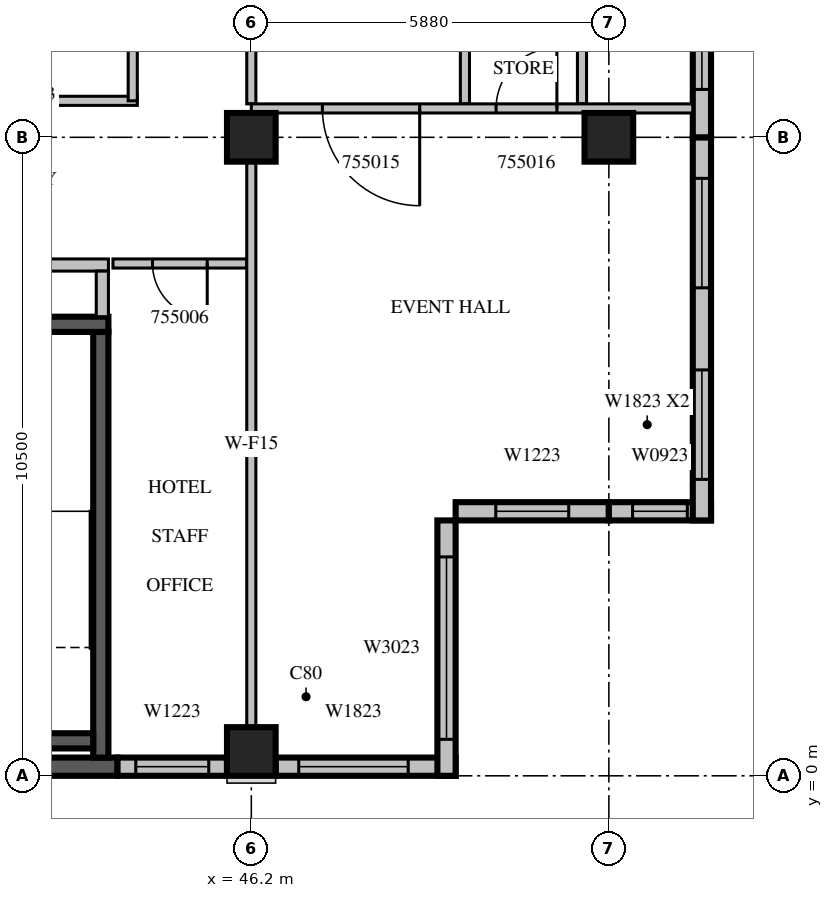
"""IFC4 building model, lengths in metres.
Left out: names, types, materials, properties, quantities, classifications, styles, units other than length and angle.
Written with IfcOpenShell. Run it as: python <this file> out.ifc"""

import sys

from ifc_helpers import new_model, si_unit, direction, frame, frame_2d, origin, origin_2d, place, context, subcontext, project, spatial, rectangle, extrude, source, transform, mapped, element, fill, save


model = new_model("IFC4")
c1 = context("Model", 3, precision=1e-05, world=origin(), true_north=direction((0.0, 1.0)))
c2 = subcontext(c1, "Body", "Model", "MODEL_VIEW")
j1 = project(units=[si_unit("LENGTHUNIT", "METRE"), si_unit("PLANEANGLEUNIT", "RADIAN")], contexts=[c1])
p1 = place(None, origin())
s1 = spatial("IfcSite", under=j1, at=p1, CompositionType="ELEMENT")
p2 = place(p1, origin())
s2 = spatial("IfcBuilding", under=s1, at=p2, CompositionType="ELEMENT")
p3 = place(p2, frame((0.0, 0.0, 242.4)))
s3 = spatial("IfcBuildingStorey", under=s2, at=p3, CompositionType="ELEMENT", Elevation=242.4)
m1 = source(origin(), c2, "Body", "SweptSolid", [
    extrude(rectangle(XDim=0.8, YDim=0.8, at=origin_2d()), origin(), (0.0, 0.0, 1.0), 3.8),
])
for number, where, z_axis, x_axis in (
    (1, (46.2, 0.4, 0.0), (0.0, 0.0, 1.0), (1.0, 0.0, 0.0)),
    (2, (46.2, 10.5, 0.0), (0.0, 0.0, 1.0), (1.0, 0.0, 0.0)),
    (3, (52.08, 10.5, 0.0), (0.0, 0.0, 1.0), (1.0, 0.0, 0.0)),
):
    element("IfcColumn", number, at=place(p3, frame(where, z_axis=z_axis, x_axis=x_axis)), inside=s3, PredefinedType="COLUMN", context=c2, shape_type="MappedRepresentation", body=[
        mapped(m1, transform((0.0, 0.0, 0.0), scale=1.0)),
    ])
m2 = source(origin(), c2, "Body", "SweptSolid", [
    extrude(rectangle(XDim=3.8, YDim=0.3, at=frame_2d((1.9, 0.0))), origin(), (0.0, 0.0, 1.0), 3.4),
])
p4 = place(p3, frame((40.2, 0.15, 0.0), z_axis=(0.0, 0.0, 1.0), x_axis=(1.0, 0.0, 0.0)))
e4 = element("IfcWall", 4, at=p4, inside=s3, PredefinedType="SOLIDWALL", context=c2, shape_type="MappedRepresentation", body=[
    mapped(m2, transform((0.0, 0.0, 0.0), scale=1.0)),
])
m3 = source(origin(), c2, "Body", "SweptSolid", [
    extrude(rectangle(XDim=1.8, YDim=0.3, at=frame_2d((0.9, 0.0))), origin(), (0.0, 0.0, 1.0), 3.4),
])
p5 = place(p3, frame((44.0, 0.15, 0.0), z_axis=(0.0, 0.0, 1.0), x_axis=(1.0, 0.0, 0.0)))
e5 = element("IfcWall", 5, at=p5, inside=s3, PredefinedType="STANDARD", context=c2, shape_type="MappedRepresentation", body=[
    mapped(m3, transform((0.0, 0.0, 0.0), scale=1.0)),
])
m4 = source(origin(), c2, "Body", "SweptSolid", [
    extrude(rectangle(XDim=1.2, YDim=2.3, at=frame_2d((0.6, 1.15))), frame((0.0, 0.16, 0.0), z_axis=(0.0, -1.0, 0.0), x_axis=(1.0, 0.0, 0.0)), (0.0, 0.0, 1.0), 0.32),
])
p6 = place(p5, frame((0.3, 0.0, 0.6)))
e6 = element("IfcOpeningElement", 6, at=p6, cuts=e5, PredefinedType="OPENING", context=c2, shape_type="MappedRepresentation", body=[
    mapped(m4, transform((0.0, 0.0, 0.0), scale=1.0)),
])
m5 = source(origin(), c2, "Body", "SweptSolid", [
    extrude(rectangle(XDim=2.96, YDim=0.3, at=frame_2d((1.48, 0.0))), origin(), (0.0, 0.0, 1.0), 3.4),
])
p7 = place(p3, frame((46.6, 0.15, 0.0), z_axis=(0.0, 0.0, 1.0), x_axis=(1.0, 0.0, 0.0)))
e7 = element("IfcWall", 7, at=p7, inside=s3, PredefinedType="STANDARD", context=c2, shape_type="MappedRepresentation", body=[
    mapped(m5, transform((0.0, 0.0, 0.0), scale=1.0)),
])
m6 = source(origin(), c2, "Body", "SweptSolid", [
    extrude(rectangle(XDim=1.8, YDim=2.3, at=frame_2d((0.9, 1.15))), frame((0.0, 0.16, 0.0), z_axis=(0.0, -1.0, 0.0), x_axis=(1.0, 0.0, 0.0)), (0.0, 0.0, 1.0), 0.32),
])
p8 = place(p7, frame((0.38, 0.0, 0.6)))
e8 = element("IfcOpeningElement", 8, at=p8, cuts=e7, PredefinedType="OPENING", context=c2, shape_type="MappedRepresentation", body=[
    mapped(m6, transform((0.0, 0.0, 0.0), scale=1.0)),
])
m7 = source(origin(), c2, "Body", "SweptSolid", [
    extrude(rectangle(XDim=4.2, YDim=0.3, at=frame_2d((2.1, 0.0))), origin(), (0.0, 0.0, 1.0), 3.4),
])
p9 = place(p3, frame((49.41, 0.0, 0.0), z_axis=(0.0, 0.0, 1.0), x_axis=(0.0, 1.0, 0.0)))
e9 = element("IfcWall", 9, at=p9, inside=s3, PredefinedType="STANDARD", context=c2, shape_type="MappedRepresentation", body=[
    mapped(m7, transform((0.0, 0.0, 0.0), scale=1.0)),
])
m8 = source(origin(), c2, "Body", "SweptSolid", [
    extrude(rectangle(XDim=3.0, YDim=2.3, at=frame_2d((1.5, 1.15))), frame((0.0, 0.16, 0.0), z_axis=(0.0, -1.0, 0.0), x_axis=(1.0, 0.0, 0.0)), (0.0, 0.0, 1.0), 0.32),
])
p10 = place(p9, frame((0.6, 0.0, 0.6)))
e10 = element("IfcOpeningElement", 10, at=p10, cuts=e9, PredefinedType="OPENING", context=c2, shape_type="MappedRepresentation", body=[
    mapped(m8, transform((0.0, 0.0, 0.0), scale=1.0)),
])
m9 = source(origin(), c2, "Body", "SweptSolid", [
    extrude(rectangle(XDim=2.52, YDim=0.3, at=frame_2d((1.26, 0.0))), origin(), (0.0, 0.0, 1.0), 3.4),
])
p11 = place(p3, frame((49.56, 4.35, 0.0), z_axis=(0.0, 0.0, 1.0), x_axis=(1.0, 0.0, 0.0)))
e11 = element("IfcWall", 11, at=p11, inside=s3, PredefinedType="STANDARD", context=c2, shape_type="MappedRepresentation", body=[
    mapped(m9, transform((0.0, 0.0, 0.0), scale=1.0)),
])
p12 = place(p11, frame((0.66, 0.0, 0.6)))
e12 = element("IfcOpeningElement", 12, at=p12, cuts=e11, PredefinedType="OPENING", context=c2, shape_type="MappedRepresentation", body=[
    mapped(m4, transform((0.0, 0.0, 0.0), scale=1.0)),
])
m10 = source(origin(), c2, "Body", "SweptSolid", [
    extrude(rectangle(XDim=1.68, YDim=0.3, at=frame_2d((0.84, 0.0))), origin(), (0.0, 0.0, 1.0), 3.4),
])
p13 = place(p3, frame((52.08, 4.35, 0.0), z_axis=(0.0, 0.0, 1.0), x_axis=(1.0, 0.0, 0.0)))
e13 = element("IfcWall", 13, at=p13, inside=s3, PredefinedType="STANDARD", context=c2, shape_type="MappedRepresentation", body=[
    mapped(m10, transform((0.0, 0.0, 0.0), scale=1.0)),
])
m11 = source(origin(), c2, "Body", "SweptSolid", [
    extrude(rectangle(XDim=0.9, YDim=2.3, at=frame_2d((0.45, 1.15))), frame((0.0, 0.16, 0.0), z_axis=(0.0, -1.0, 0.0), x_axis=(1.0, 0.0, 0.0)), (0.0, 0.0, 1.0), 0.32),
])
p14 = place(p13, frame((0.39, 0.0, 0.6)))
e14 = element("IfcOpeningElement", 14, at=p14, cuts=e13, PredefinedType="OPENING", context=c2, shape_type="MappedRepresentation", body=[
    mapped(m11, transform((0.0, 0.0, 0.0), scale=1.0)),
])
m12 = source(origin(), c2, "Body", "SweptSolid", [
    extrude(rectangle(XDim=6.3, YDim=0.3, at=frame_2d((3.15, 0.0))), origin(), (0.0, 0.0, 1.0), 3.4),
])
p15 = place(p3, frame((53.61, 4.2, 0.0), z_axis=(0.0, 0.0, 1.0), x_axis=(0.0, 1.0, 0.0)))
e15 = element("IfcWall", 15, at=p15, inside=s3, PredefinedType="STANDARD", context=c2, shape_type="MappedRepresentation", body=[
    mapped(m12, transform((0.0, 0.0, 0.0), scale=1.0)),
])
p16 = place(p15, frame((0.675, 0.0, 0.6)))
e16 = element("IfcOpeningElement", 16, at=p16, cuts=e15, PredefinedType="OPENING", context=c2, shape_type="MappedRepresentation", body=[
    mapped(m6, transform((0.0, 0.0, 0.0), scale=1.0)),
])
p17 = place(p15, frame((3.825, 0.0, 0.6)))
e17 = element("IfcOpeningElement", 17, at=p17, cuts=e15, PredefinedType="OPENING", context=c2, shape_type="MappedRepresentation", body=[
    mapped(m6, transform((0.0, 0.0, 0.0), scale=1.0)),
])
m13 = source(origin(), c2, "Body", "SweptSolid", [
    extrude(rectangle(XDim=6.75, YDim=0.3, at=frame_2d((3.375, 0.0))), origin(), (0.0, 0.0, 1.0), 3.4),
])
p18 = place(p3, frame((53.61, 10.5, 0.0), z_axis=(0.0, 0.0, 1.0), x_axis=(0.0, 1.0, 0.0)))
e18 = element("IfcWall", 18, at=p18, inside=s3, PredefinedType="STANDARD", context=c2, shape_type="MappedRepresentation", body=[
    mapped(m13, transform((0.0, 0.0, 0.0), scale=1.0)),
])
p19 = place(p18, frame((0.787, 0.0, 0.6)))
e19 = element("IfcOpeningElement", 19, at=p19, cuts=e18, PredefinedType="OPENING", context=c2, shape_type="MappedRepresentation", body=[
    mapped(m6, transform((0.0, 0.0, 0.0), scale=1.0)),
])
p20 = place(p18, frame((4.606, 0.0, 0.6)))
e20 = element("IfcOpeningElement", 20, at=p20, cuts=e18, PredefinedType="OPENING", context=c2, shape_type="MappedRepresentation", body=[
    mapped(m4, transform((0.0, 0.0, 0.0), scale=1.0)),
])
m14 = source(origin(), c2, "Body", "SweptSolid", [
    extrude(rectangle(XDim=7.0, YDim=0.25, at=frame_2d((3.5, 0.0))), origin(), (0.0, 0.0, 1.0), 3.4),
])
p21 = place(p3, frame((43.725, 0.3, 0.0), z_axis=(0.0, 0.0, 1.0), x_axis=(0.0, 1.0, 0.0)))
e21 = element("IfcWall", 21, at=p21, inside=s3, PredefinedType="SOLIDWALL", context=c2, shape_type="MappedRepresentation", body=[
    mapped(m14, transform((0.0, 0.0, 0.0), scale=1.0)),
])
m15 = source(origin(), c2, "Body", "SweptSolid", [
    extrude(rectangle(XDim=3.45, YDim=0.25, at=frame_2d((1.725, 0.0))), origin(), (0.0, 0.0, 1.0), 3.4),
])
p22 = place(p3, frame((40.4, 7.425, 0.0), z_axis=(0.0, 0.0, 1.0), x_axis=(1.0, 0.0, 0.0)))
e22 = element("IfcWall", 22, at=p22, inside=s3, PredefinedType="SOLIDWALL", context=c2, shape_type="MappedRepresentation", body=[
    mapped(m15, transform((0.0, 0.0, 0.0), scale=1.0)),
])
m16 = source(origin(), c2, "Body", "SweptSolid", [
    extrude(rectangle(XDim=2.95, YDim=0.25, at=frame_2d((1.475, 0.0))), origin(), (0.0, 0.0, 1.0), 3.4),
])
p23 = place(p3, frame((40.65, 0.575, 0.0), z_axis=(0.0, 0.0, 1.0), x_axis=(1.0, 0.0, 0.0)))
e23 = element("IfcWall", 23, at=p23, inside=s3, PredefinedType="SOLIDWALL", context=c2, shape_type="MappedRepresentation", body=[
    mapped(m16, transform((0.0, 0.0, 0.0), scale=1.0)),
])
m17 = source(origin(), c2, "Body", "SweptSolid", [
    extrude(rectangle(XDim=5.45, YDim=0.2, at=frame_2d((2.725, 0.0))), origin(), (0.0, 0.0, 1.0), 3.4),
])
p24 = place(p3, frame((38.4, 8.4, 0.0), z_axis=(0.0, 0.0, 1.0), x_axis=(1.0, 0.0, 0.0)))
e24 = element("IfcWall", 24, at=p24, inside=s3, PredefinedType="PARTITIONING", context=c2, shape_type="MappedRepresentation", body=[
    mapped(m17, transform((0.0, 0.0, 0.0), scale=1.0)),
])
m18 = source(origin(), c2, "Body", "SweptSolid", [
    extrude(rectangle(XDim=1.2, YDim=2.1, at=frame_2d((0.6, 1.05))), frame((0.0, 0.11, 0.0), z_axis=(0.0, -1.0, 0.0), x_axis=(1.0, 0.0, 0.0)), (0.0, 0.0, 1.0), 0.22),
])
p25 = place(p24, frame((0.4, 0.0, 0.0)))
e25 = element("IfcOpeningElement", 25, at=p25, cuts=e24, PredefinedType="OPENING", context=c2, shape_type="MappedRepresentation", body=[
    mapped(m18, transform((0.0, 0.0, 0.0), scale=1.0)),
])
m19 = source(origin(), c2, "Body", "SweptSolid", [
    extrude(rectangle(XDim=0.9, YDim=2.1, at=frame_2d((0.45, 1.05))), frame((0.0, 0.11, 0.0), z_axis=(0.0, -1.0, 0.0), x_axis=(1.0, 0.0, 0.0)), (0.0, 0.0, 1.0), 0.22),
])
p26 = place(p24, frame((3.25, 0.0, 0.0)))
e26 = element("IfcOpeningElement", 26, at=p26, cuts=e24, PredefinedType="OPENING", context=c2, shape_type="MappedRepresentation", body=[
    mapped(m19, transform((0.0, 0.0, 0.0), scale=1.0)),
])
m20 = source(origin(), c2, "Body", "SweptSolid", [
    extrude(rectangle(XDim=0.75, YDim=0.2, at=frame_2d((0.375, 0.0))), origin(), (0.0, 0.0, 1.0), 3.4),
])
p27 = place(p3, frame((43.75, 7.55, 0.0), z_axis=(0.0, 0.0, 1.0), x_axis=(0.0, 1.0, 0.0)))
e27 = element("IfcWall", 27, at=p27, inside=s3, PredefinedType="PARTITIONING", context=c2, shape_type="MappedRepresentation", body=[
    mapped(m20, transform((0.0, 0.0, 0.0), scale=1.0)),
])
m21 = source(origin(), c2, "Body", "SweptSolid", [
    extrude(rectangle(XDim=6.45, YDim=0.15, at=frame_2d((3.225, 0.0))), origin(), (0.0, 0.0, 1.0), 3.4),
])
p28 = place(p3, frame((37.875, 11.1, 0.0), z_axis=(0.0, 0.0, 1.0), x_axis=(1.0, 0.0, 0.0)))
e28 = element("IfcWall", 28, at=p28, inside=s3, PredefinedType="PARTITIONING", context=c2, shape_type="MappedRepresentation", body=[
    mapped(m21, transform((0.0, 0.0, 0.0), scale=1.0)),
])
m22 = source(origin(), c2, "Body", "SweptSolid", [
    extrude(rectangle(XDim=3.675, YDim=0.15, at=frame_2d((1.837, 0.0))), origin(), (0.0, 0.0, 1.0), 3.4),
])
p29 = place(p3, frame((44.25, 11.1, 0.0), z_axis=(0.0, 0.0, 1.0), x_axis=(0.0, 1.0, 0.0)))
e29 = element("IfcWall", 29, at=p29, inside=s3, PredefinedType="PARTITIONING", context=c2, shape_type="MappedRepresentation", body=[
    mapped(m22, transform((0.0, 0.0, 0.0), scale=1.0)),
])
m23 = source(origin(), c2, "Body", "SweptSolid", [
    extrude(rectangle(XDim=2.2, YDim=0.15, at=frame_2d((1.1, 0.0))), origin(), (0.0, 0.0, 1.0), 3.4),
])
p30 = place(p3, frame((46.125, 8.425, 0.0), z_axis=(0.0, 0.0, 1.0), x_axis=(-1.0, 0.0, 0.0)))
e30 = element("IfcWall", 30, at=p30, inside=s3, PredefinedType="PARTITIONING", context=c2, shape_type="MappedRepresentation", body=[
    mapped(m23, transform((0.0, 0.0, 0.0), scale=1.0)),
])
m24 = source(origin(), c2, "Body", "SweptSolid", [
    extrude(rectangle(XDim=0.9, YDim=2.1, at=frame_2d((0.45, 1.05))), frame((0.0, 0.085, 0.0), z_axis=(0.0, -1.0, 0.0), x_axis=(1.0, 0.0, 0.0)), (0.0, 0.0, 1.0), 0.17),
])
p31 = place(p30, frame((0.65, 0.0, 0.0)))
e31 = element("IfcOpeningElement", 31, at=p31, cuts=e30, PredefinedType="OPENING", context=c2, shape_type="MappedRepresentation", body=[
    mapped(m24, transform((0.0, 0.0, 0.0), scale=1.0)),
])
m25 = source(origin(), c2, "Body", "SweptSolid", [
    extrude(rectangle(XDim=3.65, YDim=0.15, at=frame_2d((1.825, 0.0))), origin(), (0.0, 0.0, 1.0), 3.4),
])
p32 = place(p3, frame((49.713, 11.05, 0.0), z_axis=(0.0, 0.0, 1.0), x_axis=(0.0, 1.0, 0.0)))
e32 = element("IfcWall", 32, at=p32, inside=s3, PredefinedType="PARTITIONING", context=c2, shape_type="MappedRepresentation", body=[
    mapped(m25, transform((0.0, 0.0, 0.0), scale=1.0)),
])
p33 = place(p3, frame((51.638, 11.05, 0.0), z_axis=(0.0, 0.0, 1.0), x_axis=(0.0, 1.0, 0.0)))
e33 = element("IfcWall", 33, at=p33, inside=s3, PredefinedType="PARTITIONING", context=c2, shape_type="MappedRepresentation", body=[
    mapped(m25, transform((0.0, 0.0, 0.0), scale=1.0)),
])
p34 = place(p33, frame((1.375, 0.0, 0.0)))
e34 = element("IfcOpeningElement", 34, at=p34, cuts=e33, PredefinedType="OPENING", context=c2, shape_type="MappedRepresentation", body=[
    mapped(m24, transform((0.0, 0.0, 0.0), scale=1.0)),
])
m26 = source(origin(), c2, "Body", "SweptSolid", [
    extrude(rectangle(XDim=9.302, YDim=0.15, at=frame_2d((4.651, 0.0))), origin(), (0.0, 0.0, 1.0), 3.4),
])
p35 = place(p3, frame((46.2, 0.799, 0.0), z_axis=(0.0, 0.0, 1.0), x_axis=(0.0, 1.0, 0.0)))
e35 = element("IfcWall", 35, at=p35, inside=s3, PredefinedType="PARTITIONING", context=c2, shape_type="MappedRepresentation", body=[
    mapped(m26, transform((0.0, 0.0, 0.0), scale=1.0)),
])
p36 = place(p3, frame((46.2, 11.05, 0.0), z_axis=(0.0, 0.0, 1.0), x_axis=(0.0, 1.0, 0.0)))
e36 = element("IfcWall", 36, at=p36, inside=s3, PredefinedType="PARTITIONING", context=c2, shape_type="MappedRepresentation", body=[
    mapped(m25, transform((0.0, 0.0, 0.0), scale=1.0)),
])
m27 = source(origin(), c2, "Body", "SweptSolid", [
    extrude(rectangle(XDim=7.26, YDim=0.15, at=frame_2d((3.63, 0.0))), origin(), (0.0, 0.0, 1.0), 3.4),
])
p37 = place(p3, frame((53.46, 10.975, 0.0), z_axis=(0.0, 0.0, 1.0), x_axis=(-1.0, 0.0, 0.0)))
e37 = element("IfcWall", 37, at=p37, inside=s3, PredefinedType="PARTITIONING", context=c2, shape_type="MappedRepresentation", body=[
    mapped(m27, transform((0.0, 0.0, 0.0), scale=1.0)),
])
m28 = source(origin(), c2, "Body", "SweptSolid", [
    extrude(rectangle(XDim=1.6, YDim=2.1, at=frame_2d((0.8, 1.05))), frame((0.0, 0.085, 0.0), z_axis=(0.0, -1.0, 0.0), x_axis=(1.0, 0.0, 0.0)), (0.0, 0.0, 1.0), 0.17),
])
p38 = place(p37, frame((4.491, 0.0, 0.0)))
e38 = element("IfcOpeningElement", 38, at=p38, cuts=e37, PredefinedType="OPENING", context=c2, shape_type="MappedRepresentation", body=[
    mapped(m28, transform((0.0, 0.0, 0.0), scale=1.0)),
])
m29 = source(origin(), c2, "Body", "SweptSolid", [
    extrude(rectangle(XDim=1.0, YDim=2.1, at=frame_2d((0.5, 1.05))), frame((0.0, 0.085, 0.0), z_axis=(0.0, -1.0, 0.0), x_axis=(1.0, 0.0, 0.0)), (0.0, 0.0, 1.0), 0.17),
])
p39 = place(p37, frame((2.235, 0.0, 0.0)))
e39 = element("IfcOpeningElement", 39, at=p39, cuts=e37, PredefinedType="OPENING", context=c2, shape_type="MappedRepresentation", body=[
    mapped(m29, transform((0.0, 0.0, 0.0), scale=1.0)),
])
m30 = source(origin(), c2, "Body", "SweptSolid", [
    extrude(rectangle(XDim=1.2, YDim=2.3, at=frame_2d((0.6, 1.15))), frame((0.0, 0.03, 0.0), z_axis=(0.0, -1.0, 0.0), x_axis=(1.0, 0.0, 0.0)), (0.0, 0.0, 1.0), 0.06),
])
p40 = place(p6, origin())
e40 = element("IfcWindow", 40, at=p40, inside=s3, PartitioningType="SINGLE_PANEL", PredefinedType="WINDOW", context=c2, shape_type="MappedRepresentation", body=[
    mapped(m30, transform((0.0, 0.0, 0.0), scale=1.0)),
])
fill(e6, e40)
m31 = source(origin(), c2, "Body", "SweptSolid", [
    extrude(rectangle(XDim=1.8, YDim=2.3, at=frame_2d((0.9, 1.15))), frame((0.0, 0.03, 0.0), z_axis=(0.0, -1.0, 0.0), x_axis=(1.0, 0.0, 0.0)), (0.0, 0.0, 1.0), 0.06),
])
p41 = place(p8, origin())
e41 = element("IfcWindow", 41, at=p41, inside=s3, PartitioningType="SINGLE_PANEL", PredefinedType="WINDOW", context=c2, shape_type="MappedRepresentation", body=[
    mapped(m31, transform((0.0, 0.0, 0.0), scale=1.0)),
])
fill(e8, e41)
m32 = source(origin(), c2, "Body", "SweptSolid", [
    extrude(rectangle(XDim=3.0, YDim=2.3, at=frame_2d((1.5, 1.15))), frame((0.0, 0.03, 0.0), z_axis=(0.0, -1.0, 0.0), x_axis=(1.0, 0.0, 0.0)), (0.0, 0.0, 1.0), 0.06),
])
p42 = place(p10, origin())
e42 = element("IfcWindow", 42, at=p42, inside=s3, PartitioningType="SINGLE_PANEL", PredefinedType="WINDOW", context=c2, shape_type="MappedRepresentation", body=[
    mapped(m32, transform((0.0, 0.0, 0.0), scale=1.0)),
])
fill(e10, e42)
p43 = place(p12, origin())
e43 = element("IfcWindow", 43, at=p43, inside=s3, PartitioningType="SINGLE_PANEL", PredefinedType="WINDOW", context=c2, shape_type="MappedRepresentation", body=[
    mapped(m30, transform((0.0, 0.0, 0.0), scale=1.0)),
])
fill(e12, e43)
m33 = source(origin(), c2, "Body", "SweptSolid", [
    extrude(rectangle(XDim=0.9, YDim=2.3, at=frame_2d((0.45, 1.15))), frame((0.0, 0.03, 0.0), z_axis=(0.0, -1.0, 0.0), x_axis=(1.0, 0.0, 0.0)), (0.0, 0.0, 1.0), 0.06),
])
p44 = place(p14, origin())
e44 = element("IfcWindow", 44, at=p44, inside=s3, PartitioningType="SINGLE_PANEL", PredefinedType="WINDOW", context=c2, shape_type="MappedRepresentation", body=[
    mapped(m33, transform((0.0, 0.0, 0.0), scale=1.0)),
])
fill(e14, e44)
p45 = place(p16, origin())
e45 = element("IfcWindow", 45, at=p45, inside=s3, PartitioningType="SINGLE_PANEL", PredefinedType="WINDOW", context=c2, shape_type="MappedRepresentation", body=[
    mapped(m31, transform((0.0, 0.0, 0.0), scale=1.0)),
])
fill(e16, e45)
p46 = place(p17, origin())
e46 = element("IfcWindow", 46, at=p46, inside=s3, PartitioningType="SINGLE_PANEL", PredefinedType="WINDOW", context=c2, shape_type="MappedRepresentation", body=[
    mapped(m31, transform((0.0, 0.0, 0.0), scale=1.0)),
])
fill(e17, e46)
p47 = place(p19, origin())
e47 = element("IfcWindow", 47, at=p47, inside=s3, PartitioningType="SINGLE_PANEL", PredefinedType="WINDOW", context=c2, shape_type="MappedRepresentation", body=[
    mapped(m31, transform((0.0, 0.0, 0.0), scale=1.0)),
])
fill(e19, e47)
m34 = source(origin(), c2, "Body", "SweptSolid", [
    extrude(rectangle(XDim=0.9, YDim=2.1, at=frame_2d((0.45, 1.05))), frame((0.0, 0.025, 0.0), z_axis=(0.0, -1.0, 0.0), x_axis=(1.0, 0.0, 0.0)), (0.0, 0.0, 1.0), 0.05),
])
p48 = place(p31, origin())
e48 = element("IfcDoor", 48, at=p48, inside=s3, OperationType="SINGLE_SWING_LEFT", PredefinedType="DOOR", context=c2, shape_type="MappedRepresentation", body=[
    mapped(m34, transform((0.0, 0.0, 0.0), scale=1.0)),
])
fill(e31, e48)
m35 = source(origin(), c2, "Body", "SweptSolid", [
    extrude(rectangle(XDim=1.6, YDim=2.1, at=frame_2d((0.8, 1.05))), frame((0.0, 0.025, 0.0), z_axis=(0.0, -1.0, 0.0), x_axis=(1.0, 0.0, 0.0)), (0.0, 0.0, 1.0), 0.05),
])
p49 = place(p38, origin())
e49 = element("IfcDoor", 49, at=p49, inside=s3, OperationType="SINGLE_SWING_LEFT", PredefinedType="DOOR", context=c2, shape_type="MappedRepresentation", body=[
    mapped(m35, transform((0.0, 0.0, 0.0), scale=1.0)),
])
fill(e38, e49)
m36 = source(origin(), c2, "Body", "SweptSolid", [
    extrude(rectangle(XDim=1.0, YDim=2.1, at=frame_2d((0.5, 1.05))), frame((0.0, 0.025, 0.0), z_axis=(0.0, -1.0, 0.0), x_axis=(1.0, 0.0, 0.0)), (0.0, 0.0, 1.0), 0.05),
])
p50 = place(p39, origin())
e50 = element("IfcDoor", 50, at=p50, inside=s3, OperationType="SINGLE_SWING_RIGHT", PredefinedType="DOOR", context=c2, shape_type="MappedRepresentation", body=[
    mapped(m36, transform((0.0, 0.0, 0.0), scale=1.0)),
])
fill(e39, e50)
save(model, sys.argv[1])
